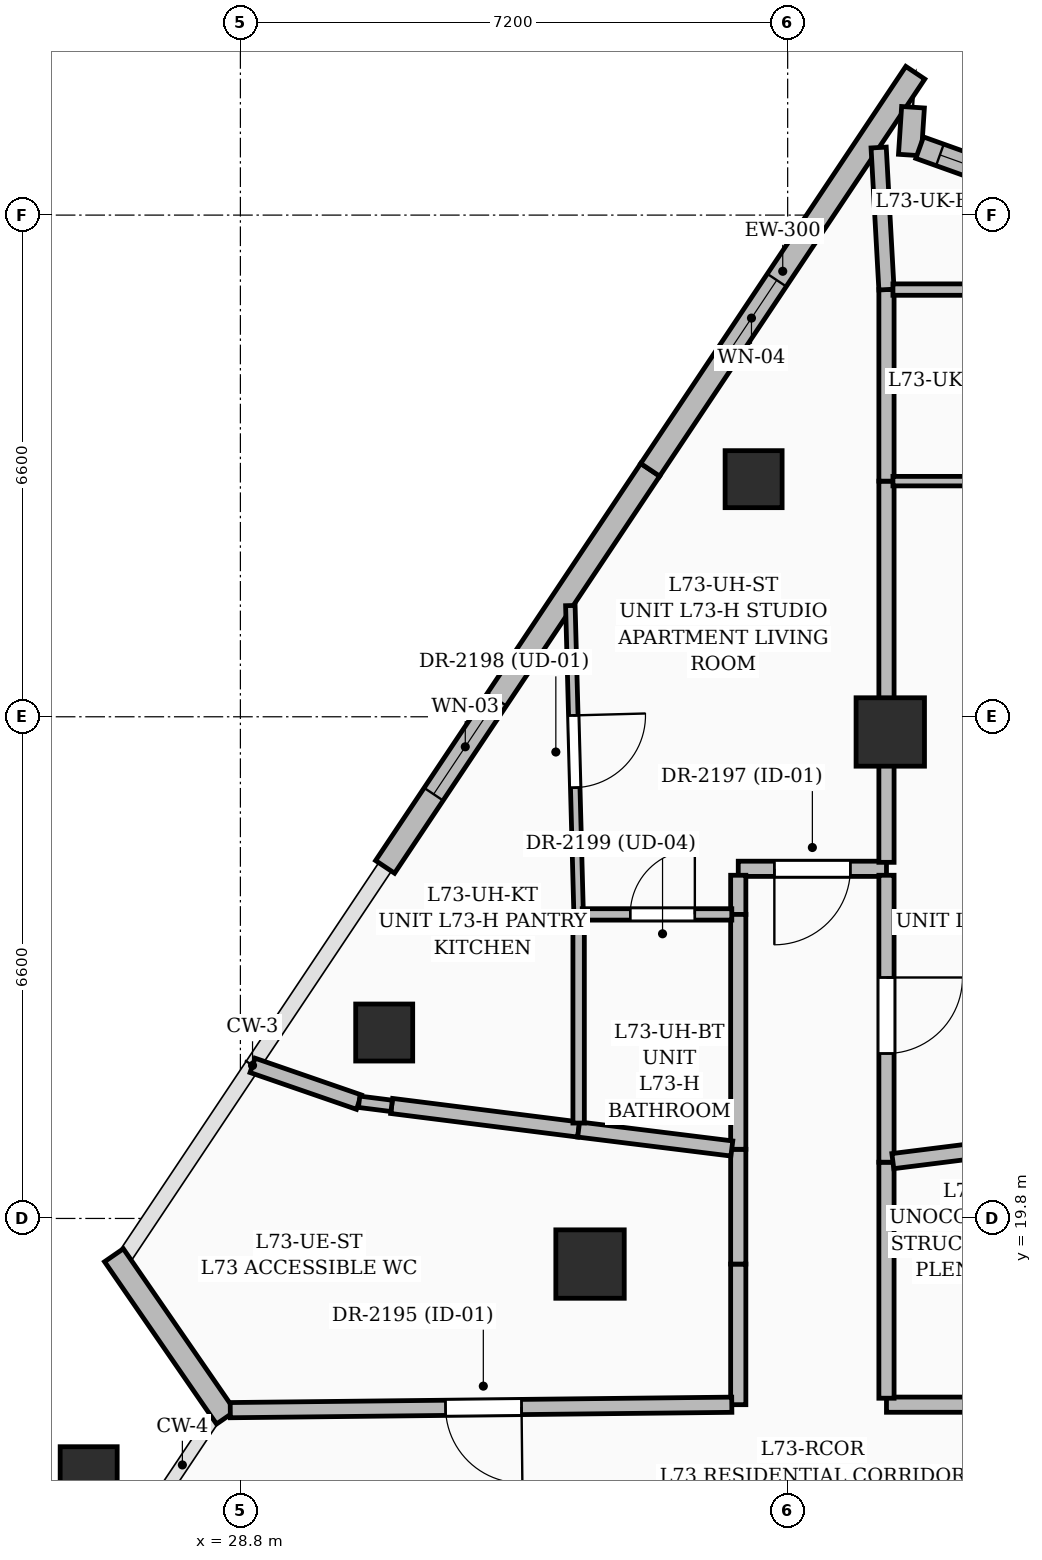
"""IFC4 building model, lengths in metres.
Left out: names, types, materials, properties, quantities, classifications, styles, units other than length and angle.
Written with IfcOpenShell. Run it as: python <this file> out.ifc"""

import sys

from ifc_helpers import new_model, si_unit, direction, frame, frame_2d, origin, origin_2d, place, context, subcontext, project, spatial, rectangle, extrude, element, fill, save


model = new_model("IFC4")
c1 = context("Model", 3, precision=1e-05, world=origin(), true_north=direction((0.0, 1.0)))
c2 = subcontext(c1, "Body", "Model", "MODEL_VIEW")
j1 = project(units=[si_unit("LENGTHUNIT", "METRE"), si_unit("PLANEANGLEUNIT", "RADIAN")], contexts=[c1])
p1 = place(None, origin())
s1 = spatial("IfcSite", under=j1, at=p1, CompositionType="ELEMENT")
p2 = place(p1, origin())
s2 = spatial("IfcBuilding", under=s1, at=p2, CompositionType="ELEMENT")
p3 = place(p2, frame((0.0, 0.0, 282.0)))
s3 = spatial("IfcBuildingStorey", under=s2, at=p3, CompositionType="ELEMENT", Elevation=282.0)
for number, where, z_axis, x_axis in (
    (1, (37.35, 26.2, 0.0), (0.0, 0.0, 1.0), (1.0, 0.0, 0.0)),
    (2, (33.4, 19.2, 0.0), (0.0, 0.0, 1.0), (1.0, 0.0, 0.0)),
):
    element("IfcColumn", number, at=place(p3, frame(where, z_axis=z_axis, x_axis=x_axis)), inside=s3, PredefinedType="COLUMN", context=c2, shape_type="SweptSolid", body=[
        extrude(rectangle(XDim=0.9, YDim=0.9, at=origin_2d()), origin(), (0.0, 0.0, 1.0), 3.75),
    ])
for number, where, z_axis, x_axis in (
    (3, (35.552, 29.526, 0.0), (0.0, 0.0, 1.0), (1.0, 0.0, 0.0)),
    (4, (30.692, 22.246, 0.0), (0.0, 0.0, 1.0), (1.0, 0.0, 0.0)),
    (5, (26.804, 16.422, 0.0), (0.0, 0.0, 1.0), (1.0, 0.0, 0.0)),
):
    element("IfcColumn", number, at=place(p3, frame(where, z_axis=z_axis, x_axis=x_axis)), inside=s3, PredefinedType="COLUMN", context=c2, shape_type="SweptSolid", body=[
        extrude(rectangle(XDim=0.75, YDim=0.75, at=origin_2d()), origin(), (0.0, 0.0, 1.0), 3.75),
    ])
p4 = place(p3, frame((28.61, 17.181, 0.0), z_axis=(0.0, 0.0, 1.0), x_axis=(-0.567878097956, 0.823112668996, 0.0)))
e6 = element("IfcWall", 6, at=p4, inside=s3, PredefinedType="SOLIDWALL", context=c2, shape_type="SweptSolid", body=[
    extrude(rectangle(XDim=2.594, YDim=0.3, at=frame_2d((1.297, 0.0))), origin(), (0.0, 0.0, 1.0), 2.696),
])
p5 = place(p3, frame((30.704, 24.425, 0.0), z_axis=(0.0, 0.0, 1.0), x_axis=(0.555274120739, 0.831667391953, 0.0)))
e7 = element("IfcWall", 7, at=p5, inside=s3, PredefinedType="SOLIDWALL", context=c2, shape_type="SweptSolid", body=[
    extrude(rectangle(XDim=6.281, YDim=0.3, at=frame_2d((3.141, 0.0))), origin(), (0.0, 0.0, 1.0), 3.5),
])
p6 = place(p5, frame((1.15, 0.0, 0.6)))
e8 = element("IfcOpeningElement", 8, at=p6, cuts=e7, PredefinedType="OPENING", context=c2, shape_type="SweptSolid", body=[
    extrude(rectangle(XDim=1.5, YDim=2.1, at=frame_2d((0.75, 1.05))), frame((0.0, 0.16, 0.0), z_axis=(0.0, -1.0, 0.0), x_axis=(1.0, 0.0, 0.0)), (0.0, 0.0, 1.0), 0.32),
])
p7 = place(p3, frame((34.191, 29.649, 0.0), z_axis=(0.0, 0.0, 1.0), x_axis=(0.555229286711, 0.831697324259, 0.0)))
e9 = element("IfcWall", 9, at=p7, inside=s3, PredefinedType="SOLIDWALL", context=c2, shape_type="SweptSolid", body=[
    extrude(rectangle(XDim=6.281, YDim=0.3, at=frame_2d((3.141, 0.0))), origin(), (0.0, 0.0, 1.0), 3.5),
])
p8 = place(p7, frame((1.8, 0.0, 0.8)))
e10 = element("IfcOpeningElement", 10, at=p8, cuts=e9, PredefinedType="OPENING", context=c2, shape_type="SweptSolid", body=[
    extrude(rectangle(XDim=1.2, YDim=1.8, at=frame_2d((0.6, 0.9))), frame((0.0, 0.16, 0.0), z_axis=(0.0, -1.0, 0.0), x_axis=(1.0, 0.0, 0.0)), (0.0, 0.0, 1.0), 0.32),
])
p9 = place(p3, frame((37.649, 34.419, 0.0), z_axis=(0.0, 0.0, 1.0), x_axis=(-0.065490172125, -0.997853214333, 0.0)))
e11 = element("IfcWall", 11, at=p9, inside=s3, PredefinedType="SOLIDWALL", context=c2, shape_type="SweptSolid", body=[
    extrude(rectangle(XDim=0.63, YDim=0.3, at=frame_2d((0.315, 0.0))), origin(), (0.0, 0.0, 1.0), 3.5),
])
p10 = place(p3, frame((37.737, 33.887, 0.0), z_axis=(0.0, 0.0, 1.0), x_axis=(0.941665242227, -0.336550994028, 0.0)))
e12 = element("IfcWall", 12, at=p10, inside=s3, PredefinedType="SOLIDWALL", context=c2, shape_type="SweptSolid", body=[
    extrude(rectangle(XDim=2.09, YDim=0.3, at=frame_2d((1.045, 0.0))), origin(), (0.0, 0.0, 1.0), 3.5),
])
p11 = place(p10, frame((0.283, 0.0, 0.8)))
e13 = element("IfcOpeningElement", 13, at=p11, cuts=e12, PredefinedType="OPENING", context=c2, shape_type="SweptSolid", body=[
    extrude(rectangle(XDim=1.2, YDim=1.8, at=frame_2d((0.6, 0.9))), frame((0.0, 0.16, 0.0), z_axis=(0.0, -1.0, 0.0), x_axis=(1.0, 0.0, 0.0)), (0.0, 0.0, 1.0), 0.32),
])
p12 = place(p3, frame((35.35, 19.2, 0.0), z_axis=(0.0, 0.0, 1.0), x_axis=(0.0, -1.0, 0.0)))
e14 = element("IfcWall", 14, at=p12, inside=s3, PredefinedType="PARTITIONING", context=c2, shape_type="SweptSolid", body=[
    extrude(rectangle(XDim=1.85, YDim=0.2, at=frame_2d((0.925, 0.0))), origin(), (0.0, 0.0, 1.0), 3.003),
])
p13 = place(p3, frame((35.265, 17.349, 0.0), z_axis=(0.0, 0.0, 1.0), x_axis=(-0.999941633147, -0.010804179718, 0.0)))
e15 = element("IfcWall", 15, at=p13, inside=s3, PredefinedType="PARTITIONING", context=c2, shape_type="SweptSolid", body=[
    extrude(rectangle(XDim=6.598, YDim=0.2, at=frame_2d((3.299, 0.0))), origin(), (0.0, 0.0, 1.0), 2.685),
])
p14 = place(p13, frame((2.766, 0.0, 0.0)))
e16 = element("IfcOpeningElement", 16, at=p14, cuts=e15, PredefinedType="OPENING", context=c2, shape_type="SweptSolid", body=[
    extrude(rectangle(XDim=1.0, YDim=2.2, at=frame_2d((0.5, 1.1))), frame((0.0, 0.11, 0.0), z_axis=(0.0, -1.0, 0.0), x_axis=(1.0, 0.0, 0.0)), (0.0, 0.0, 1.0), 0.22),
])
p15 = place(p3, frame((35.35, 20.71, 0.0), z_axis=(0.0, 0.0, 1.0), x_axis=(0.0, -1.0, 0.0)))
e17 = element("IfcWall", 17, at=p15, inside=s3, PredefinedType="PARTITIONING", context=c2, shape_type="SweptSolid", body=[
    extrude(rectangle(XDim=1.51, YDim=0.2, at=frame_2d((0.755, 0.0))), origin(), (0.0, 0.0, 1.0), 3.003),
])
p16 = place(p3, frame((39.2, 17.35, 0.0), z_axis=(0.0, 0.0, 1.0), x_axis=(-1.0, 0.0, 0.0)))
e18 = element("IfcWall", 18, at=p16, inside=s3, PredefinedType="PARTITIONING", context=c2, shape_type="SweptSolid", body=[
    extrude(rectangle(XDim=1.9, YDim=0.2, at=frame_2d((0.95, 0.0))), origin(), (0.0, 0.0, 1.0), 3.5),
])
p17 = place(p3, frame((37.3, 17.435, 0.0), z_axis=(0.0, 0.0, 1.0), x_axis=(0.0, 1.0, 0.0)))
e19 = element("IfcWall", 19, at=p17, inside=s3, PredefinedType="PARTITIONING", context=c2, shape_type="SweptSolid", body=[
    extrude(rectangle(XDim=3.105, YDim=0.2, at=frame_2d((1.552, 0.0))), origin(), (0.0, 0.0, 1.0), 3.003),
])
p18 = place(p3, frame((37.3, 24.4, 0.0), z_axis=(0.0, 0.0, 1.0), x_axis=(-1.0, 0.0, 0.0)))
e20 = element("IfcWall", 20, at=p18, inside=s3, PredefinedType="PARTITIONING", context=c2, shape_type="SweptSolid", body=[
    extrude(rectangle(XDim=1.95, YDim=0.2, at=frame_2d((0.975, 0.0))), origin(), (0.0, 0.0, 1.0), 2.685),
])
p19 = place(p18, frame((0.475, 0.0, 0.0)))
e21 = element("IfcOpeningElement", 21, at=p19, cuts=e20, PredefinedType="OPENING", context=c2, shape_type="SweptSolid", body=[
    extrude(rectangle(XDim=1.0, YDim=2.2, at=frame_2d((0.5, 1.1))), frame((0.0, 0.11, 0.0), z_axis=(0.0, -1.0, 0.0), x_axis=(1.0, 0.0, 0.0)), (0.0, 0.0, 1.0), 0.22),
])
p20 = place(p3, frame((35.35, 24.315, 0.0), z_axis=(0.0, 0.0, 1.0), x_axis=(0.0, -1.0, 0.0)))
e22 = element("IfcWall", 22, at=p20, inside=s3, PredefinedType="PARTITIONING", context=c2, shape_type="SweptSolid", body=[
    extrude(rectangle(XDim=0.515, YDim=0.2, at=frame_2d((0.257, 0.0))), origin(), (0.0, 0.0, 1.0), 3.5),
])
p21 = place(p3, frame((35.35, 23.8, 0.0), z_axis=(0.0, 0.0, 1.0), x_axis=(0.0, -1.0, 0.0)))
e23 = element("IfcWall", 23, at=p21, inside=s3, PredefinedType="PARTITIONING", context=c2, shape_type="SweptSolid", body=[
    extrude(rectangle(XDim=3.09, YDim=0.2, at=frame_2d((1.545, 0.0))), origin(), (0.0, 0.0, 1.0), 2.685),
])
p22 = place(p3, frame((37.3, 24.315, 0.0), z_axis=(0.0, 0.0, 1.0), x_axis=(0.0, -1.0, 0.0)))
e24 = element("IfcWall", 24, at=p22, inside=s3, PredefinedType="PARTITIONING", context=c2, shape_type="SweptSolid", body=[
    extrude(rectangle(XDim=3.775, YDim=0.2, at=frame_2d((1.887, 0.0))), origin(), (0.0, 0.0, 1.0), 3.5),
])
p23 = place(p22, frame((1.345, 0.0, 0.0)))
e25 = element("IfcOpeningElement", 25, at=p23, cuts=e24, PredefinedType="OPENING", context=c2, shape_type="SweptSolid", body=[
    extrude(rectangle(XDim=1.0, YDim=2.2, at=frame_2d((0.5, 1.1))), frame((0.0, 0.11, 0.0), z_axis=(0.0, -1.0, 0.0), x_axis=(1.0, 0.0, 0.0)), (0.0, 0.0, 1.0), 0.22),
])
p24 = place(p3, frame((30.36, 21.33, 0.0), z_axis=(0.0, 0.0, 1.0), x_axis=(-0.945148583182, 0.32664071349, 0.0)))
e26 = element("IfcWall", 26, at=p24, inside=s3, PredefinedType="PARTITIONING", context=c2, shape_type="SweptSolid", body=[
    extrude(rectangle(XDim=1.481, YDim=0.2, at=frame_2d((0.741, 0.0))), origin(), (0.0, 0.0, 1.0), 2.691),
])
p25 = place(p3, frame((33.25, 20.97, 0.0), z_axis=(0.0, 0.0, 1.0), x_axis=(-0.992150105298, 0.125052663133, 0.0)))
e27 = element("IfcWall", 27, at=p25, inside=s3, PredefinedType="PARTITIONING", context=c2, shape_type="SweptSolid", body=[
    extrude(rectangle(XDim=2.479, YDim=0.2, at=frame_2d((1.24, 0.0))), origin(), (0.0, 0.0, 1.0), 2.835),
])
p26 = place(p3, frame((35.266, 20.72, 0.0), z_axis=(0.0, 0.0, 1.0), x_axis=(-0.992425117341, 0.122851074361, 0.0)))
e28 = element("IfcWall", 28, at=p26, inside=s3, PredefinedType="PARTITIONING", context=c2, shape_type="SweptSolid", body=[
    extrude(rectangle(XDim=2.031, YDim=0.2, at=frame_2d((1.016, 0.0))), origin(), (0.0, 0.0, 1.0), 2.685),
])
p27 = place(p3, frame((39.44, 20.812, 0.0), z_axis=(0.0, 0.0, 1.0), x_axis=(-0.992205225353, -0.124614568901, 0.0)))
e29 = element("IfcWall", 29, at=p27, inside=s3, PredefinedType="PARTITIONING", context=c2, shape_type="SweptSolid", body=[
    extrude(rectangle(XDim=2.073, YDim=0.2, at=frame_2d((1.036, 0.0))), origin(), (0.0, 0.0, 1.0), 3.5),
])
p28 = place(p3, frame((33.141, 27.863, 0.0), z_axis=(0.0, 0.0, 1.0), x_axis=(0.02679004463, -0.999641082343, 0.0)))
e30 = element("IfcWall", 30, at=p28, inside=s3, PredefinedType="PARTITIONING", context=c2, shape_type="SweptSolid", body=[
    extrude(rectangle(XDim=4.064, YDim=0.125, at=frame_2d((2.032, 0.0))), origin(), (0.0, 0.0, 1.0), 2.691),
])
p29 = place(p28, frame((1.446, 0.0, 0.0)))
e31 = element("IfcOpeningElement", 31, at=p29, cuts=e30, PredefinedType="OPENING", context=c2, shape_type="SweptSolid", body=[
    extrude(rectangle(XDim=0.95, YDim=2.2, at=frame_2d((0.475, 1.1))), frame((0.0, 0.072, 0.0), z_axis=(0.0, -1.0, 0.0), x_axis=(1.0, 0.0, 0.0)), (0.0, 0.0, 1.0), 0.145),
])
p30 = place(p3, frame((33.298, 23.8, 0.0), z_axis=(0.0, 0.0, 1.0), x_axis=(1.0, 0.0, 0.0)))
e32 = element("IfcWall", 32, at=p30, inside=s3, PredefinedType="PARTITIONING", context=c2, shape_type="SweptSolid", body=[
    extrude(rectangle(XDim=1.967, YDim=0.15, at=frame_2d((0.984, 0.0))), origin(), (0.0, 0.0, 1.0), 3.01),
])
p31 = place(p30, frame((0.631, 0.0, 0.0)))
e33 = element("IfcOpeningElement", 33, at=p31, cuts=e32, PredefinedType="OPENING", context=c2, shape_type="SweptSolid", body=[
    extrude(rectangle(XDim=0.85, YDim=2.1, at=frame_2d((0.425, 1.05))), frame((0.0, 0.085, 0.0), z_axis=(0.0, -1.0, 0.0), x_axis=(1.0, 0.0, 0.0)), (0.0, 0.0, 1.0), 0.17),
])
p32 = place(p3, frame((37.3, 24.485, 0.0), z_axis=(0.0, 0.0, 1.0), x_axis=(0.0, 1.0, 0.0)))
e34 = element("IfcWall", 34, at=p32, inside=s3, PredefinedType="PARTITIONING", context=c2, shape_type="SweptSolid", body=[
    extrude(rectangle(XDim=5.015, YDim=0.2, at=frame_2d((2.507, 0.0))), origin(), (0.0, 0.0, 1.0), 2.685),
])
p33 = place(p3, frame((37.3, 29.5, 0.0), z_axis=(0.0, 0.0, 1.0), x_axis=(0.0, 1.0, 0.0)))
e35 = element("IfcWall", 35, at=p33, inside=s3, PredefinedType="PARTITIONING", context=c2, shape_type="SweptSolid", body=[
    extrude(rectangle(XDim=2.52, YDim=0.2, at=frame_2d((1.26, 0.0))), origin(), (0.0, 0.0, 1.0), 2.691),
])
p34 = place(p3, frame((37.3, 32.02, 0.0), z_axis=(0.0, 0.0, 1.0), x_axis=(-0.055043791408, 0.998483941297, 0.0)))
e36 = element("IfcWall", 36, at=p34, inside=s3, PredefinedType="PARTITIONING", context=c2, shape_type="SweptSolid", body=[
    extrude(rectangle(XDim=1.872, YDim=0.2, at=frame_2d((0.936, 0.0))), origin(), (0.0, 0.0, 1.0), 3.5),
])
p35 = place(p3, frame((33.25, 21.055, 0.0), z_axis=(0.0, 0.0, 1.0), x_axis=(0.0, 1.0, 0.0)))
e37 = element("IfcWall", 37, at=p35, inside=s3, PredefinedType="PARTITIONING", context=c2, shape_type="SweptSolid", body=[
    extrude(rectangle(XDim=2.733, YDim=0.15, at=frame_2d((1.366, 0.0))), origin(), (0.0, 0.0, 1.0), 3.01),
])
p36 = place(p3, frame((40.785, 29.5, 0.0), z_axis=(0.0, 0.0, 1.0), x_axis=(-1.0, 0.0, 0.0)))
e38 = element("IfcWall", 38, at=p36, inside=s3, PredefinedType="PARTITIONING", context=c2, shape_type="SweptSolid", body=[
    extrude(rectangle(XDim=3.4, YDim=0.125, at=frame_2d((1.7, 0.0))), origin(), (0.0, 0.0, 1.0), 2.691),
])
p37 = place(p36, frame((1.225, 0.0, 0.0)))
e39 = element("IfcOpeningElement", 39, at=p37, cuts=e38, PredefinedType="OPENING", context=c2, shape_type="SweptSolid", body=[
    extrude(rectangle(XDim=0.95, YDim=2.2, at=frame_2d((0.475, 1.1))), frame((0.0, 0.072, 0.0), z_axis=(0.0, -1.0, 0.0), x_axis=(1.0, 0.0, 0.0)), (0.0, 0.0, 1.0), 0.145),
])
p38 = place(p3, frame((40.785, 32.02, 0.0), z_axis=(0.0, 0.0, 1.0), x_axis=(-1.0, 0.0, 0.0)))
e40 = element("IfcWall", 40, at=p38, inside=s3, PredefinedType="PARTITIONING", context=c2, shape_type="SweptSolid", body=[
    extrude(rectangle(XDim=3.4, YDim=0.15, at=frame_2d((1.7, 0.0))), origin(), (0.0, 0.0, 1.0), 3.5),
])
p39 = place(p38, frame((1.217, 0.0, 0.0)))
e41 = element("IfcOpeningElement", 41, at=p39, cuts=e40, PredefinedType="OPENING", context=c2, shape_type="SweptSolid", body=[
    extrude(rectangle(XDim=0.85, YDim=2.1, at=frame_2d((0.425, 1.05))), frame((0.0, 0.085, 0.0), z_axis=(0.0, -1.0, 0.0), x_axis=(1.0, 0.0, 0.0)), (0.0, 0.0, 1.0), 0.17),
])
p40 = place(p3, frame((30.79, 21.281, 0.0), z_axis=(0.0, 0.0, 1.0), x_axis=(-0.992146717956, 0.125079534893, 0.0)))
e42 = element("IfcWall", 42, at=p40, inside=s3, PredefinedType="PARTITIONING", context=c2, shape_type="SweptSolid", body=[
    extrude(rectangle(XDim=0.431, YDim=0.15, at=frame_2d((0.216, 0.0))), origin(), (0.0, 0.0, 1.0), 3.5),
])
p41 = place(p6, origin())
e43 = element("IfcWindow", 43, at=p41, inside=s3, PartitioningType="SINGLE_PANEL", PredefinedType="WINDOW", context=c2, shape_type="SweptSolid", body=[
    extrude(rectangle(XDim=1.5, YDim=2.1, at=frame_2d((0.75, 1.05))), frame((0.0, 0.03, 0.0), z_axis=(0.0, -1.0, 0.0), x_axis=(1.0, 0.0, 0.0)), (0.0, 0.0, 1.0), 0.06),
])
fill(e8, e43)
p42 = place(p8, origin())
e44 = element("IfcWindow", 44, at=p42, inside=s3, PartitioningType="SINGLE_PANEL", PredefinedType="WINDOW", context=c2, shape_type="SweptSolid", body=[
    extrude(rectangle(XDim=1.2, YDim=1.8, at=frame_2d((0.6, 0.9))), frame((0.0, 0.03, 0.0), z_axis=(0.0, -1.0, 0.0), x_axis=(1.0, 0.0, 0.0)), (0.0, 0.0, 1.0), 0.06),
])
fill(e10, e44)
p43 = place(p11, origin())
e45 = element("IfcWindow", 45, at=p43, inside=s3, PartitioningType="SINGLE_PANEL", PredefinedType="WINDOW", context=c2, shape_type="SweptSolid", body=[
    extrude(rectangle(XDim=1.2, YDim=1.8, at=frame_2d((0.6, 0.9))), frame((0.0, 0.03, 0.0), z_axis=(0.0, -1.0, 0.0), x_axis=(1.0, 0.0, 0.0)), (0.0, 0.0, 1.0), 0.06),
])
fill(e13, e45)
p44 = place(p14, origin())
e46 = element("IfcDoor", 46, at=p44, inside=s3, OperationType="SINGLE_SWING_LEFT", PredefinedType="DOOR", context=c2, shape_type="SweptSolid", body=[
    extrude(rectangle(XDim=1.0, YDim=2.2, at=frame_2d((0.5, 1.1))), frame((0.0, 0.025, 0.0), z_axis=(0.0, -1.0, 0.0), x_axis=(1.0, 0.0, 0.0)), (0.0, 0.0, 1.0), 0.05),
])
fill(e16, e46)
p45 = place(p19, origin())
e47 = element("IfcDoor", 47, at=p45, inside=s3, OperationType="SINGLE_SWING_RIGHT", PredefinedType="DOOR", context=c2, shape_type="SweptSolid", body=[
    extrude(rectangle(XDim=1.0, YDim=2.2, at=frame_2d((0.5, 1.1))), frame((0.0, 0.025, 0.0), z_axis=(0.0, -1.0, 0.0), x_axis=(1.0, 0.0, 0.0)), (0.0, 0.0, 1.0), 0.05),
])
fill(e21, e47)
p46 = place(p29, origin())
e48 = element("IfcDoor", 48, at=p46, inside=s3, OperationType="SINGLE_SWING_LEFT", PredefinedType="DOOR", context=c2, shape_type="SweptSolid", body=[
    extrude(rectangle(XDim=0.95, YDim=2.2, at=frame_2d((0.475, 1.1))), frame((0.0, 0.025, 0.0), z_axis=(0.0, -1.0, 0.0), x_axis=(1.0, 0.0, 0.0)), (0.0, 0.0, 1.0), 0.05),
])
fill(e31, e48)
p47 = place(p31, origin())
e49 = element("IfcDoor", 49, at=p47, inside=s3, OperationType="SINGLE_SWING_RIGHT", PredefinedType="DOOR", context=c2, shape_type="SweptSolid", body=[
    extrude(rectangle(XDim=0.85, YDim=2.1, at=frame_2d((0.425, 1.05))), frame((0.0, 0.025, 0.0), z_axis=(0.0, -1.0, 0.0), x_axis=(1.0, 0.0, 0.0)), (0.0, 0.0, 1.0), 0.05),
])
fill(e33, e49)
p48 = place(p23, origin())
e50 = element("IfcDoor", 50, at=p48, inside=s3, OperationType="SINGLE_SWING_LEFT", PredefinedType="DOOR", context=c2, shape_type="SweptSolid", body=[
    extrude(rectangle(XDim=1.0, YDim=2.2, at=frame_2d((0.5, 1.1))), frame((0.0, 0.025, 0.0), z_axis=(0.0, -1.0, 0.0), x_axis=(1.0, 0.0, 0.0)), (0.0, 0.0, 1.0), 0.05),
])
fill(e25, e50)
save(model, sys.argv[1])
